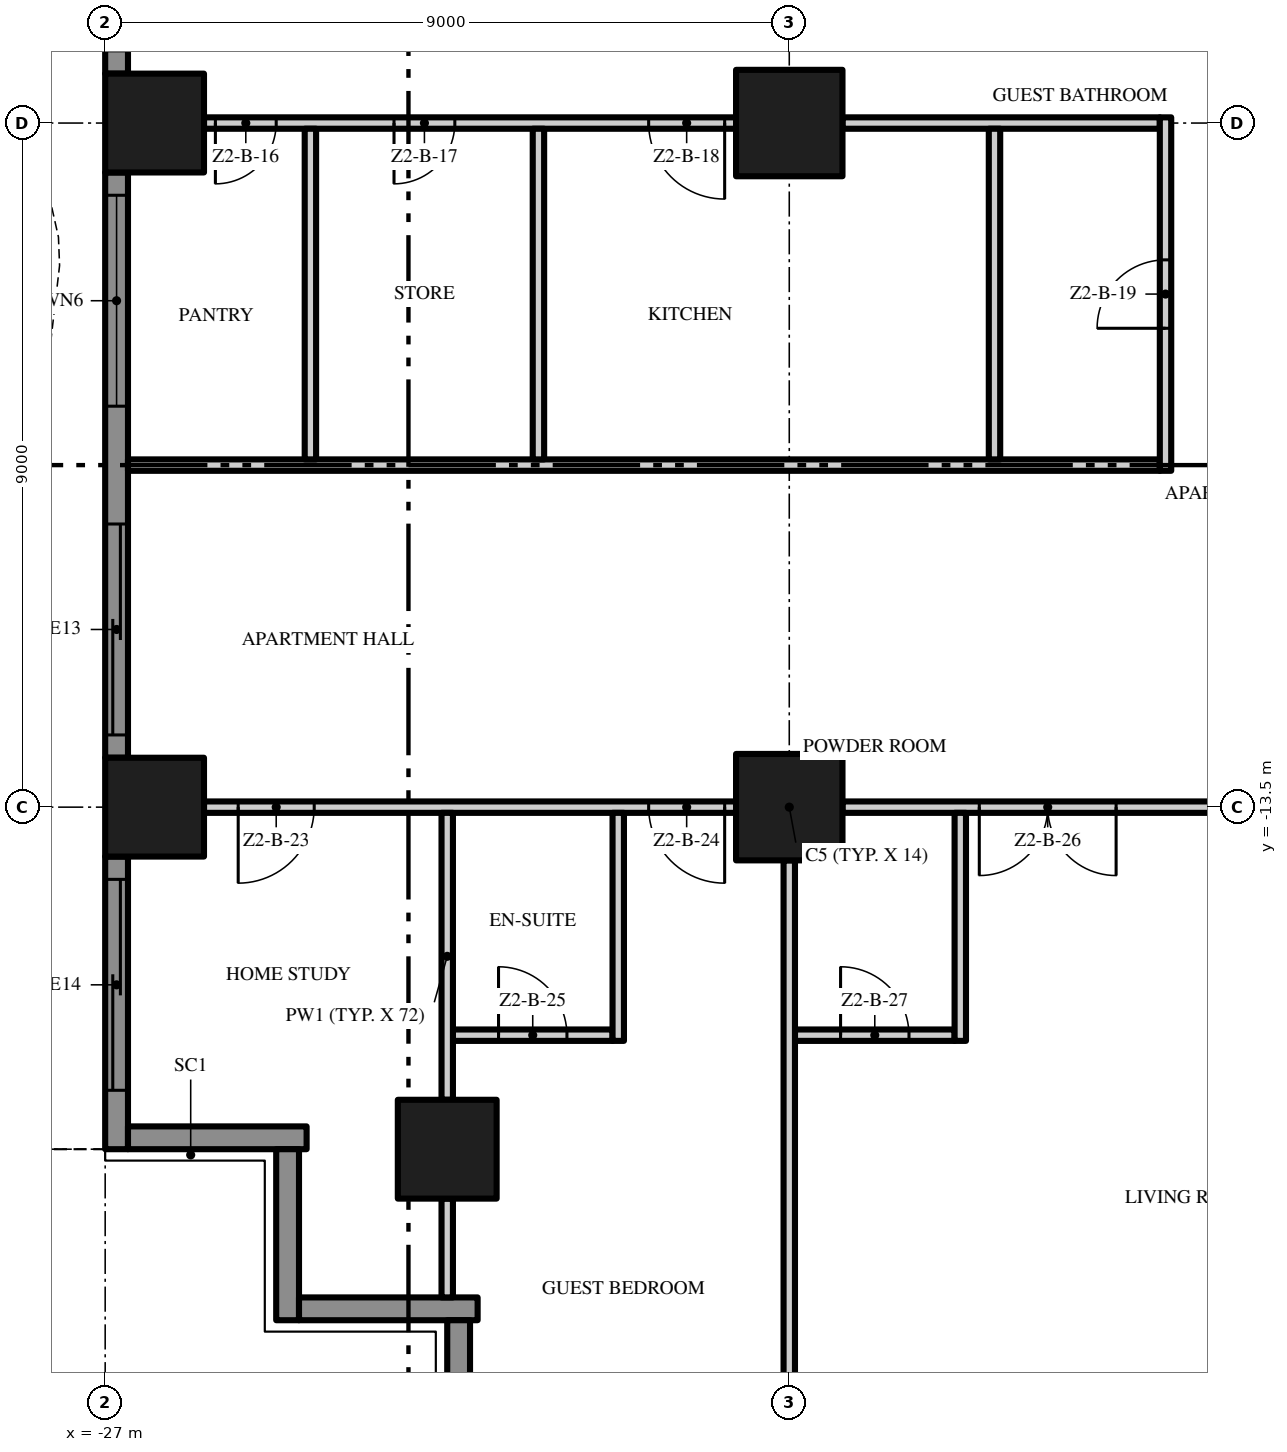
"""IFC4 building model, lengths in metres.
Left out: names, types, materials, properties, quantities, classifications, styles, units other than length and angle.
Written with IfcOpenShell. Run it as: python <this file> out.ifc"""

import sys

from ifc_helpers import new_model, si_unit, direction, frame, frame_2d, origin, origin_2d, place, context, subcontext, project, spatial, polyline, rectangle, outline, extrude, element, fill, save


model = new_model("IFC4")
c1 = context("Model", 3, precision=1e-05, world=origin(), true_north=direction((0.0, 1.0)))
c2 = subcontext(c1, "Body", "Model", "MODEL_VIEW")
j1 = project(units=[si_unit("LENGTHUNIT", "METRE"), si_unit("PLANEANGLEUNIT", "RADIAN")], contexts=[c1])
p1 = place(None, origin())
s1 = spatial("IfcSite", under=j1, at=p1, CompositionType="ELEMENT")
p2 = place(p1, origin())
s2 = spatial("IfcBuilding", under=s1, at=p2, CompositionType="ELEMENT")
p3 = place(p2, frame((0.0, 0.0, 80.8)))
s3 = spatial("IfcBuildingStorey", under=s2, at=p3, CompositionType="ELEMENT", Elevation=80.8)
for number, where, z_axis, x_axis in (
    (1, (-18.0, -13.5, 0.0), (0.0, 0.0, 1.0), (1.0, 0.0, 0.0)),
    (2, (-18.0, -4.5, 0.0), (0.0, 0.0, 1.0), (1.0, 0.0, 0.0)),
):
    element("IfcColumn", number, at=place(p3, frame(where, z_axis=z_axis, x_axis=x_axis)), inside=s3, PredefinedType="COLUMN", context=c2, shape_type="SweptSolid", body=[
        extrude(rectangle(XDim=1.4, YDim=1.4, at=origin_2d()), origin(), (0.0, 0.0, 1.0), 3.5),
    ])
for number, where, z_axis, x_axis in (
    (3, (-26.35, -13.5, 0.0), (0.0, 0.0, 1.0), (1.0, 0.0, 0.0)),
    (4, (-22.5, -18.0, 0.0), (0.0, 0.0, 1.0), (1.0, 0.0, 0.0)),
    (5, (-26.35, -4.5, 0.0), (0.0, 0.0, 1.0), (1.0, 0.0, 0.0)),
):
    element("IfcColumn", number, at=place(p3, frame(where, z_axis=z_axis, x_axis=x_axis)), inside=s3, PredefinedType="COLUMN", context=c2, shape_type="SweptSolid", body=[
        extrude(rectangle(XDim=1.3, YDim=1.3, at=origin_2d()), origin(), (0.0, 0.0, 1.0), 3.5),
    ])
p4 = place(p3, frame((-26.85, -3.85, 0.0), z_axis=(0.0, 0.0, 1.0), x_axis=(0.0, 1.0, 0.0)))
e6 = element("IfcWall", 6, at=p4, inside=s3, PredefinedType="SOLIDWALL", context=c2, shape_type="SweptSolid", body=[
    extrude(rectangle(XDim=7.7, YDim=0.3, at=frame_2d((3.85, 0.0))), origin(), (0.0, 0.0, 1.0), 3.5),
])
p5 = place(p4, frame((4.625, 0.0, 0.0)))
e7 = element("IfcOpeningElement", 7, at=p5, cuts=e6, PredefinedType="OPENING", context=c2, shape_type="SweptSolid", body=[
    extrude(rectangle(XDim=2.775, YDim=2.4, at=frame_2d((1.387, 1.2))), frame((0.0, 0.16, 0.0), z_axis=(0.0, -1.0, 0.0), x_axis=(1.0, 0.0, 0.0)), (0.0, 0.0, 1.0), 0.32),
])
p6 = place(p4, frame((0.3, 0.0, 0.45)))
e8 = element("IfcOpeningElement", 8, at=p6, cuts=e6, PredefinedType="OPENING", context=c2, shape_type="SweptSolid", body=[
    extrude(rectangle(XDim=2.775, YDim=2.65, at=frame_2d((1.387, 1.325))), frame((0.0, 0.16, 0.0), z_axis=(0.0, -1.0, 0.0), x_axis=(1.0, 0.0, 0.0)), (0.0, 0.0, 1.0), 0.32),
])
p7 = place(p3, frame((-26.85, -12.85, 0.0), z_axis=(0.0, 0.0, 1.0), x_axis=(0.0, 1.0, 0.0)))
e9 = element("IfcWall", 9, at=p7, inside=s3, PredefinedType="SOLIDWALL", context=c2, shape_type="SweptSolid", body=[
    extrude(rectangle(XDim=7.7, YDim=0.3, at=frame_2d((3.85, 0.0))), origin(), (0.0, 0.0, 1.0), 3.5),
])
p8 = place(p7, frame((4.625, 0.0, 0.45)))
e10 = element("IfcOpeningElement", 10, at=p8, cuts=e9, PredefinedType="OPENING", context=c2, shape_type="SweptSolid", body=[
    extrude(rectangle(XDim=2.775, YDim=2.65, at=frame_2d((1.387, 1.325))), frame((0.0, 0.16, 0.0), z_axis=(0.0, -1.0, 0.0), x_axis=(1.0, 0.0, 0.0)), (0.0, 0.0, 1.0), 0.32),
])
p9 = place(p7, frame((0.3, 0.0, 0.0)))
e11 = element("IfcOpeningElement", 11, at=p9, cuts=e9, PredefinedType="OPENING", context=c2, shape_type="SweptSolid", body=[
    extrude(rectangle(XDim=2.775, YDim=2.4, at=frame_2d((1.387, 1.2))), frame((0.0, 0.16, 0.0), z_axis=(0.0, -1.0, 0.0), x_axis=(1.0, 0.0, 0.0)), (0.0, 0.0, 1.0), 0.32),
])
p10 = place(p3, frame((-26.85, -18.0, 0.0), z_axis=(0.0, 0.0, 1.0), x_axis=(0.0, 1.0, 0.0)))
e12 = element("IfcWall", 12, at=p10, inside=s3, PredefinedType="SOLIDWALL", context=c2, shape_type="SweptSolid", body=[
    extrude(rectangle(XDim=3.85, YDim=0.3, at=frame_2d((1.925, 0.0))), origin(), (0.0, 0.0, 1.0), 3.5),
])
p11 = place(p10, frame((0.775, 0.0, 0.0)))
e13 = element("IfcOpeningElement", 13, at=p11, cuts=e12, PredefinedType="OPENING", context=c2, shape_type="SweptSolid", body=[
    extrude(rectangle(XDim=2.775, YDim=2.4, at=frame_2d((1.387, 1.2))), frame((0.0, 0.16, 0.0), z_axis=(0.0, -1.0, 0.0), x_axis=(1.0, 0.0, 0.0)), (0.0, 0.0, 1.0), 0.32),
])
p12 = place(p3, frame((-24.35, -17.85, 0.0), z_axis=(0.0, 0.0, 1.0), x_axis=(-1.0, 0.0, 0.0)))
e14 = element("IfcWall", 14, at=p12, inside=s3, PredefinedType="SOLIDWALL", context=c2, shape_type="SweptSolid", body=[
    extrude(rectangle(XDim=2.35, YDim=0.3, at=frame_2d((1.175, 0.0))), origin(), (0.0, 0.0, 1.0), 3.5),
])
p13 = place(p3, frame((-24.6, -20.25, 0.0), z_axis=(0.0, 0.0, 1.0), x_axis=(0.0, 1.0, 0.0)))
e15 = element("IfcWall", 15, at=p13, inside=s3, PredefinedType="SOLIDWALL", context=c2, shape_type="SweptSolid", body=[
    extrude(rectangle(XDim=2.25, YDim=0.3, at=frame_2d((1.125, 0.0))), origin(), (0.0, 0.0, 1.0), 3.5),
])
p14 = place(p3, frame((-22.1, -20.1, 0.0), z_axis=(0.0, 0.0, 1.0), x_axis=(-1.0, 0.0, 0.0)))
e16 = element("IfcWall", 16, at=p14, inside=s3, PredefinedType="SOLIDWALL", context=c2, shape_type="SweptSolid", body=[
    extrude(rectangle(XDim=2.35, YDim=0.3, at=frame_2d((1.175, 0.0))), origin(), (0.0, 0.0, 1.0), 3.5),
])
p15 = place(p3, frame((-22.35, -22.5, 0.0), z_axis=(0.0, 0.0, 1.0), x_axis=(0.0, 1.0, 0.0)))
e17 = element("IfcWall", 17, at=p15, inside=s3, PredefinedType="SOLIDWALL", context=c2, shape_type="SweptSolid", body=[
    extrude(rectangle(XDim=2.25, YDim=0.3, at=frame_2d((1.125, 0.0))), origin(), (0.0, 0.0, 1.0), 3.5),
])
p16 = place(p3, origin())
e18 = element("IfcWall", 18, at=p16, inside=s3, PredefinedType="USERDEFINED", context=c2, shape_type="SweptSolid", body=[
    extrude(outline(polyline([(-29.649, 18.0), (-29.985, 16.5), (-30.0, 16.125), (-29.869, 15.0), (-29.345, 13.5), (-28.612, 12.0), (-27.951, 10.5), (-27.615, 9.0), (-27.6, 8.625), (-27.731, 7.5), (-28.255, 6.0), (-28.988, 4.5), (-29.649, 3.0), (-29.985, 1.5), (-30.0, 1.125), (-29.869, 0.0), (-29.345, -1.5), (-28.612, -3.0), (-27.951, -4.5), (-27.615, -6.0), (-27.6, -6.375), (-27.731, -7.5), (-28.255, -9.0), (-28.988, -10.5), (-29.649, -12.0), (-29.985, -13.5), (-30.0, -13.875), (-29.869, -15.0), (-29.345, -16.5), (-28.612, -18.0), (-28.388, -17.89), (-29.114, -16.404), (-29.624, -14.944), (-29.749, -13.865), (-29.736, -13.533), (-29.41, -12.079), (-28.761, -10.605), (-28.024, -9.096), (-27.486, -7.556), (-27.349, -6.385), (-27.366, -5.967), (-27.713, -4.421), (-28.385, -2.895), (-29.114, -1.404), (-29.624, 0.056), (-29.749, 1.135), (-29.736, 1.467), (-29.41, 2.921), (-28.761, 4.395), (-28.024, 5.904), (-27.486, 7.444), (-27.349, 8.615), (-27.366, 9.033), (-27.713, 10.579), (-28.385, 12.105), (-29.114, 13.596), (-29.624, 15.056), (-29.749, 16.135), (-29.736, 16.467), (-29.405, 17.945), (-29.649, 18.0)])), origin(), (0.0, 0.0, 1.0), 0.9),
])
p17 = place(p3, frame((-22.425, -16.5, 0.0), z_axis=(0.0, 0.0, 1.0), x_axis=(1.0, 0.0, 0.0)))
e19 = element("IfcWall", 19, at=p17, inside=s3, PredefinedType="PARTITIONING", context=c2, shape_type="SweptSolid", body=[
    extrude(rectangle(XDim=2.1, YDim=0.15, at=frame_2d((1.05, 0.0))), origin(), (0.0, 0.0, 1.0), 3.5),
])
p18 = place(p17, frame((0.6, 0.0, 0.0)))
e20 = element("IfcOpeningElement", 20, at=p18, cuts=e19, PredefinedType="OPENING", context=c2, shape_type="SweptSolid", body=[
    extrude(rectangle(XDim=0.9, YDim=2.1, at=frame_2d((0.45, 1.05))), frame((0.0, 0.085, 0.0), z_axis=(0.0, -1.0, 0.0), x_axis=(1.0, 0.0, 0.0)), (0.0, 0.0, 1.0), 0.17),
])
p19 = place(p3, frame((-17.925, -16.5, 0.0), z_axis=(0.0, 0.0, 1.0), x_axis=(1.0, 0.0, 0.0)))
e21 = element("IfcWall", 21, at=p19, inside=s3, PredefinedType="PARTITIONING", context=c2, shape_type="SweptSolid", body=[
    extrude(rectangle(XDim=2.1, YDim=0.15, at=frame_2d((1.05, 0.0))), origin(), (0.0, 0.0, 1.0), 3.5),
])
p20 = place(p19, frame((0.6, 0.0, 0.0)))
e22 = element("IfcOpeningElement", 22, at=p20, cuts=e21, PredefinedType="OPENING", context=c2, shape_type="SweptSolid", body=[
    extrude(rectangle(XDim=0.9, YDim=2.1, at=frame_2d((0.45, 1.05))), frame((0.0, 0.085, 0.0), z_axis=(0.0, -1.0, 0.0), x_axis=(1.0, 0.0, 0.0)), (0.0, 0.0, 1.0), 0.17),
])
p21 = place(p3, frame((-18.7, -13.5, 0.0), z_axis=(0.0, 0.0, 1.0), x_axis=(-1.0, 0.0, 0.0)))
e23 = element("IfcWall", 23, at=p21, inside=s3, PredefinedType="PARTITIONING", context=c2, shape_type="SweptSolid", body=[
    extrude(rectangle(XDim=7.0, YDim=0.15, at=frame_2d((3.5, 0.0))), origin(), (0.0, 0.0, 1.0), 3.5),
])
p22 = place(p21, frame((5.55, 0.0, 0.0)))
e24 = element("IfcOpeningElement", 24, at=p22, cuts=e23, PredefinedType="OPENING", context=c2, shape_type="SweptSolid", body=[
    extrude(rectangle(XDim=1.0, YDim=2.4, at=frame_2d((0.5, 1.2))), frame((0.0, 0.085, 0.0), z_axis=(0.0, -1.0, 0.0), x_axis=(1.0, 0.0, 0.0)), (0.0, 0.0, 1.0), 0.17),
])
p23 = place(p21, frame((0.15, 0.0, 0.0)))
e25 = element("IfcOpeningElement", 25, at=p23, cuts=e23, PredefinedType="OPENING", context=c2, shape_type="SweptSolid", body=[
    extrude(rectangle(XDim=1.0, YDim=2.4, at=frame_2d((0.5, 1.2))), frame((0.0, 0.085, 0.0), z_axis=(0.0, -1.0, 0.0), x_axis=(1.0, 0.0, 0.0)), (0.0, 0.0, 1.0), 0.17),
])
p24 = place(p3, frame((-9.7, -13.5, 0.0), z_axis=(0.0, 0.0, 1.0), x_axis=(-1.0, 0.0, 0.0)))
e26 = element("IfcWall", 26, at=p24, inside=s3, PredefinedType="PARTITIONING", context=c2, shape_type="SweptSolid", body=[
    extrude(rectangle(XDim=7.6, YDim=0.15, at=frame_2d((3.8, 0.0))), origin(), (0.0, 0.0, 1.0), 3.5),
])
p25 = place(p24, frame((4.0, 0.0, 0.0)))
e27 = element("IfcOpeningElement", 27, at=p25, cuts=e26, PredefinedType="OPENING", context=c2, shape_type="SweptSolid", body=[
    extrude(rectangle(XDim=1.8, YDim=2.4, at=frame_2d((0.9, 1.2))), frame((0.0, 0.085, 0.0), z_axis=(0.0, -1.0, 0.0), x_axis=(1.0, 0.0, 0.0)), (0.0, 0.0, 1.0), 0.17),
])
p26 = place(p3, frame((-26.7, -9.0, 0.0), z_axis=(0.0, 0.0, 1.0), x_axis=(1.0, 0.0, 0.0)))
e28 = element("IfcWall", 28, at=p26, inside=s3, PredefinedType="PARTITIONING", context=c2, shape_type="SweptSolid", body=[
    extrude(rectangle(XDim=13.575, YDim=0.15, at=frame_2d((6.787, 0.0))), origin(), (0.0, 0.0, 1.0), 3.5),
])
p27 = place(p3, frame((-18.7, -4.5, 0.0), z_axis=(0.0, 0.0, 1.0), x_axis=(-1.0, 0.0, 0.0)))
e29 = element("IfcWall", 29, at=p27, inside=s3, PredefinedType="PARTITIONING", context=c2, shape_type="SweptSolid", body=[
    extrude(rectangle(XDim=7.0, YDim=0.15, at=frame_2d((3.5, 0.0))), origin(), (0.0, 0.0, 1.0), 3.5),
])
p28 = place(p27, frame((6.05, 0.0, 0.0)))
e30 = element("IfcOpeningElement", 30, at=p28, cuts=e29, PredefinedType="OPENING", context=c2, shape_type="SweptSolid", body=[
    extrude(rectangle(XDim=0.8, YDim=2.0, at=frame_2d((0.4, 1.0))), frame((0.0, 0.085, 0.0), z_axis=(0.0, -1.0, 0.0), x_axis=(1.0, 0.0, 0.0)), (0.0, 0.0, 1.0), 0.17),
])
p29 = place(p27, frame((3.7, 0.0, 0.0)))
e31 = element("IfcOpeningElement", 31, at=p29, cuts=e29, PredefinedType="OPENING", context=c2, shape_type="SweptSolid", body=[
    extrude(rectangle(XDim=0.8, YDim=2.0, at=frame_2d((0.4, 1.0))), frame((0.0, 0.085, 0.0), z_axis=(0.0, -1.0, 0.0), x_axis=(1.0, 0.0, 0.0)), (0.0, 0.0, 1.0), 0.17),
])
p30 = place(p27, frame((0.15, 0.0, 0.0)))
e32 = element("IfcOpeningElement", 32, at=p30, cuts=e29, PredefinedType="OPENING", context=c2, shape_type="SweptSolid", body=[
    extrude(rectangle(XDim=1.0, YDim=2.4, at=frame_2d((0.5, 1.2))), frame((0.0, 0.085, 0.0), z_axis=(0.0, -1.0, 0.0), x_axis=(1.0, 0.0, 0.0)), (0.0, 0.0, 1.0), 0.17),
])
p31 = place(p3, frame((-17.3, -4.5, 0.0), z_axis=(0.0, 0.0, 1.0), x_axis=(1.0, 0.0, 0.0)))
e33 = element("IfcWall", 33, at=p31, inside=s3, PredefinedType="PARTITIONING", context=c2, shape_type="SweptSolid", body=[
    extrude(rectangle(XDim=4.175, YDim=0.15, at=frame_2d((2.087, 0.0))), origin(), (0.0, 0.0, 1.0), 3.5),
])
p32 = place(p3, frame((-24.3, -8.925, 0.0), z_axis=(0.0, 0.0, 1.0), x_axis=(0.0, 1.0, 0.0)))
e34 = element("IfcWall", 34, at=p32, inside=s3, PredefinedType="PARTITIONING", context=c2, shape_type="SweptSolid", body=[
    extrude(rectangle(XDim=4.35, YDim=0.15, at=frame_2d((2.175, 0.0))), origin(), (0.0, 0.0, 1.0), 3.5),
])
p33 = place(p3, frame((-22.5, -19.95, 0.0), z_axis=(0.0, 0.0, 1.0), x_axis=(0.0, 1.0, 0.0)))
e35 = element("IfcWall", 35, at=p33, inside=s3, PredefinedType="PARTITIONING", context=c2, shape_type="SweptSolid", body=[
    extrude(rectangle(XDim=1.3, YDim=0.15, at=frame_2d((0.65, 0.0))), origin(), (0.0, 0.0, 1.0), 3.5),
])
p34 = place(p3, frame((-22.5, -17.35, 0.0), z_axis=(0.0, 0.0, 1.0), x_axis=(0.0, 1.0, 0.0)))
e36 = element("IfcWall", 36, at=p34, inside=s3, PredefinedType="PARTITIONING", context=c2, shape_type="SweptSolid", body=[
    extrude(rectangle(XDim=3.775, YDim=0.15, at=frame_2d((1.887, 0.0))), origin(), (0.0, 0.0, 1.0), 3.5),
])
p35 = place(p3, frame((-21.3, -8.925, 0.0), z_axis=(0.0, 0.0, 1.0), x_axis=(0.0, 1.0, 0.0)))
e37 = element("IfcWall", 37, at=p35, inside=s3, PredefinedType="PARTITIONING", context=c2, shape_type="SweptSolid", body=[
    extrude(rectangle(XDim=4.35, YDim=0.15, at=frame_2d((2.175, 0.0))), origin(), (0.0, 0.0, 1.0), 3.5),
])
p36 = place(p3, frame((-20.25, -16.575, 0.0), z_axis=(0.0, 0.0, 1.0), x_axis=(0.0, 1.0, 0.0)))
e38 = element("IfcWall", 38, at=p36, inside=s3, PredefinedType="PARTITIONING", context=c2, shape_type="SweptSolid", body=[
    extrude(rectangle(XDim=3.0, YDim=0.15, at=frame_2d((1.5, 0.0))), origin(), (0.0, 0.0, 1.0), 3.5),
])
p37 = place(p3, frame((-18.0, -21.2, 0.0), z_axis=(0.0, 0.0, 1.0), x_axis=(0.0, 1.0, 0.0)))
e39 = element("IfcWall", 39, at=p37, inside=s3, PredefinedType="PARTITIONING", context=c2, shape_type="SweptSolid", body=[
    extrude(rectangle(XDim=7.0, YDim=0.15, at=frame_2d((3.5, 0.0))), origin(), (0.0, 0.0, 1.0), 3.5),
])
p38 = place(p3, frame((-15.75, -16.575, 0.0), z_axis=(0.0, 0.0, 1.0), x_axis=(0.0, 1.0, 0.0)))
e40 = element("IfcWall", 40, at=p38, inside=s3, PredefinedType="PARTITIONING", context=c2, shape_type="SweptSolid", body=[
    extrude(rectangle(XDim=3.0, YDim=0.15, at=frame_2d((1.5, 0.0))), origin(), (0.0, 0.0, 1.0), 3.5),
])
p39 = place(p3, frame((-15.3, -8.925, 0.0), z_axis=(0.0, 0.0, 1.0), x_axis=(0.0, 1.0, 0.0)))
e41 = element("IfcWall", 41, at=p39, inside=s3, PredefinedType="PARTITIONING", context=c2, shape_type="SweptSolid", body=[
    extrude(rectangle(XDim=4.35, YDim=0.15, at=frame_2d((2.175, 0.0))), origin(), (0.0, 0.0, 1.0), 3.5),
])
p40 = place(p3, frame((-13.05, -9.075, 0.0), z_axis=(0.0, 0.0, 1.0), x_axis=(0.0, 1.0, 0.0)))
e42 = element("IfcWall", 42, at=p40, inside=s3, PredefinedType="PARTITIONING", context=c2, shape_type="SweptSolid", body=[
    extrude(rectangle(XDim=4.65, YDim=0.15, at=frame_2d((2.325, 0.0))), origin(), (0.0, 0.0, 1.0), 3.5),
])
p41 = place(p40, frame((1.875, 0.0, 0.0)))
e43 = element("IfcOpeningElement", 43, at=p41, cuts=e42, PredefinedType="OPENING", context=c2, shape_type="SweptSolid", body=[
    extrude(rectangle(XDim=0.9, YDim=2.1, at=frame_2d((0.45, 1.05))), frame((0.0, 0.085, 0.0), z_axis=(0.0, -1.0, 0.0), x_axis=(1.0, 0.0, 0.0)), (0.0, 0.0, 1.0), 0.17),
])
p42 = place(p8, origin())
e44 = element("IfcWindow", 44, at=p42, inside=s3, PartitioningType="SINGLE_PANEL", PredefinedType="WINDOW", context=c2, shape_type="SweptSolid", body=[
    extrude(rectangle(XDim=2.775, YDim=2.65, at=frame_2d((1.387, 1.325))), frame((0.0, 0.03, 0.0), z_axis=(0.0, -1.0, 0.0), x_axis=(1.0, 0.0, 0.0)), (0.0, 0.0, 1.0), 0.06),
])
fill(e10, e44)
p43 = place(p9, origin())
e45 = element("IfcDoor", 45, at=p43, inside=s3, OperationType="SINGLE_SWING_LEFT", PredefinedType="DOOR", context=c2, shape_type="SweptSolid", body=[
    extrude(rectangle(XDim=2.775, YDim=2.4, at=frame_2d((1.387, 1.2))), frame((0.0, 0.025, 0.0), z_axis=(0.0, -1.0, 0.0), x_axis=(1.0, 0.0, 0.0)), (0.0, 0.0, 1.0), 0.05),
])
fill(e11, e45)
p44 = place(p11, origin())
e46 = element("IfcDoor", 46, at=p44, inside=s3, OperationType="SINGLE_SWING_LEFT", PredefinedType="DOOR", context=c2, shape_type="SweptSolid", body=[
    extrude(rectangle(XDim=2.775, YDim=2.4, at=frame_2d((1.387, 1.2))), frame((0.0, 0.025, 0.0), z_axis=(0.0, -1.0, 0.0), x_axis=(1.0, 0.0, 0.0)), (0.0, 0.0, 1.0), 0.05),
])
fill(e13, e46)
p45 = place(p28, origin())
e47 = element("IfcDoor", 47, at=p45, inside=s3, OperationType="SINGLE_SWING_RIGHT", PredefinedType="DOOR", context=c2, shape_type="SweptSolid", body=[
    extrude(rectangle(XDim=0.8, YDim=2.0, at=frame_2d((0.4, 1.0))), frame((0.0, 0.025, 0.0), z_axis=(0.0, -1.0, 0.0), x_axis=(1.0, 0.0, 0.0)), (0.0, 0.0, 1.0), 0.05),
])
fill(e30, e47)
p46 = place(p29, origin())
e48 = element("IfcDoor", 48, at=p46, inside=s3, OperationType="SINGLE_SWING_RIGHT", PredefinedType="DOOR", context=c2, shape_type="SweptSolid", body=[
    extrude(rectangle(XDim=0.8, YDim=2.0, at=frame_2d((0.4, 1.0))), frame((0.0, 0.025, 0.0), z_axis=(0.0, -1.0, 0.0), x_axis=(1.0, 0.0, 0.0)), (0.0, 0.0, 1.0), 0.05),
])
fill(e31, e48)
p47 = place(p30, origin())
e49 = element("IfcDoor", 49, at=p47, inside=s3, OperationType="SINGLE_SWING_LEFT", PredefinedType="DOOR", context=c2, shape_type="SweptSolid", body=[
    extrude(rectangle(XDim=1.0, YDim=2.4, at=frame_2d((0.5, 1.2))), frame((0.0, 0.025, 0.0), z_axis=(0.0, -1.0, 0.0), x_axis=(1.0, 0.0, 0.0)), (0.0, 0.0, 1.0), 0.05),
])
fill(e32, e49)
p48 = place(p41, origin())
e50 = element("IfcDoor", 50, at=p48, inside=s3, OperationType="SINGLE_SWING_LEFT", PredefinedType="DOOR", context=c2, shape_type="SweptSolid", body=[
    extrude(rectangle(XDim=0.9, YDim=2.1, at=frame_2d((0.45, 1.05))), frame((0.0, 0.025, 0.0), z_axis=(0.0, -1.0, 0.0), x_axis=(1.0, 0.0, 0.0)), (0.0, 0.0, 1.0), 0.05),
])
fill(e43, e50)
p49 = place(p22, origin())
e51 = element("IfcDoor", 51, at=p49, inside=s3, OperationType="SINGLE_SWING_RIGHT", PredefinedType="DOOR", context=c2, shape_type="SweptSolid", body=[
    extrude(rectangle(XDim=1.0, YDim=2.4, at=frame_2d((0.5, 1.2))), frame((0.0, 0.025, 0.0), z_axis=(0.0, -1.0, 0.0), x_axis=(1.0, 0.0, 0.0)), (0.0, 0.0, 1.0), 0.05),
])
fill(e24, e51)
p50 = place(p23, origin())
e52 = element("IfcDoor", 52, at=p50, inside=s3, OperationType="SINGLE_SWING_LEFT", PredefinedType="DOOR", context=c2, shape_type="SweptSolid", body=[
    extrude(rectangle(XDim=1.0, YDim=2.4, at=frame_2d((0.5, 1.2))), frame((0.0, 0.025, 0.0), z_axis=(0.0, -1.0, 0.0), x_axis=(1.0, 0.0, 0.0)), (0.0, 0.0, 1.0), 0.05),
])
fill(e25, e52)
p51 = place(p18, origin())
e53 = element("IfcDoor", 53, at=p51, inside=s3, OperationType="SINGLE_SWING_LEFT", PredefinedType="DOOR", context=c2, shape_type="SweptSolid", body=[
    extrude(rectangle(XDim=0.9, YDim=2.1, at=frame_2d((0.45, 1.05))), frame((0.0, 0.025, 0.0), z_axis=(0.0, -1.0, 0.0), x_axis=(1.0, 0.0, 0.0)), (0.0, 0.0, 1.0), 0.05),
])
fill(e20, e53)
p52 = place(p25, origin())
e54 = element("IfcDoor", 54, at=p52, inside=s3, OperationType="DOUBLE_DOOR_SINGLE_SWING", PredefinedType="DOOR", context=c2, shape_type="SweptSolid", body=[
    extrude(rectangle(XDim=1.8, YDim=2.4, at=frame_2d((0.9, 1.2))), frame((0.0, 0.025, 0.0), z_axis=(0.0, -1.0, 0.0), x_axis=(1.0, 0.0, 0.0)), (0.0, 0.0, 1.0), 0.05),
])
fill(e27, e54)
p53 = place(p20, origin())
e55 = element("IfcDoor", 55, at=p53, inside=s3, OperationType="SINGLE_SWING_LEFT", PredefinedType="DOOR", context=c2, shape_type="SweptSolid", body=[
    extrude(rectangle(XDim=0.9, YDim=2.1, at=frame_2d((0.45, 1.05))), frame((0.0, 0.025, 0.0), z_axis=(0.0, -1.0, 0.0), x_axis=(1.0, 0.0, 0.0)), (0.0, 0.0, 1.0), 0.05),
])
fill(e22, e55)
save(model, sys.argv[1])
